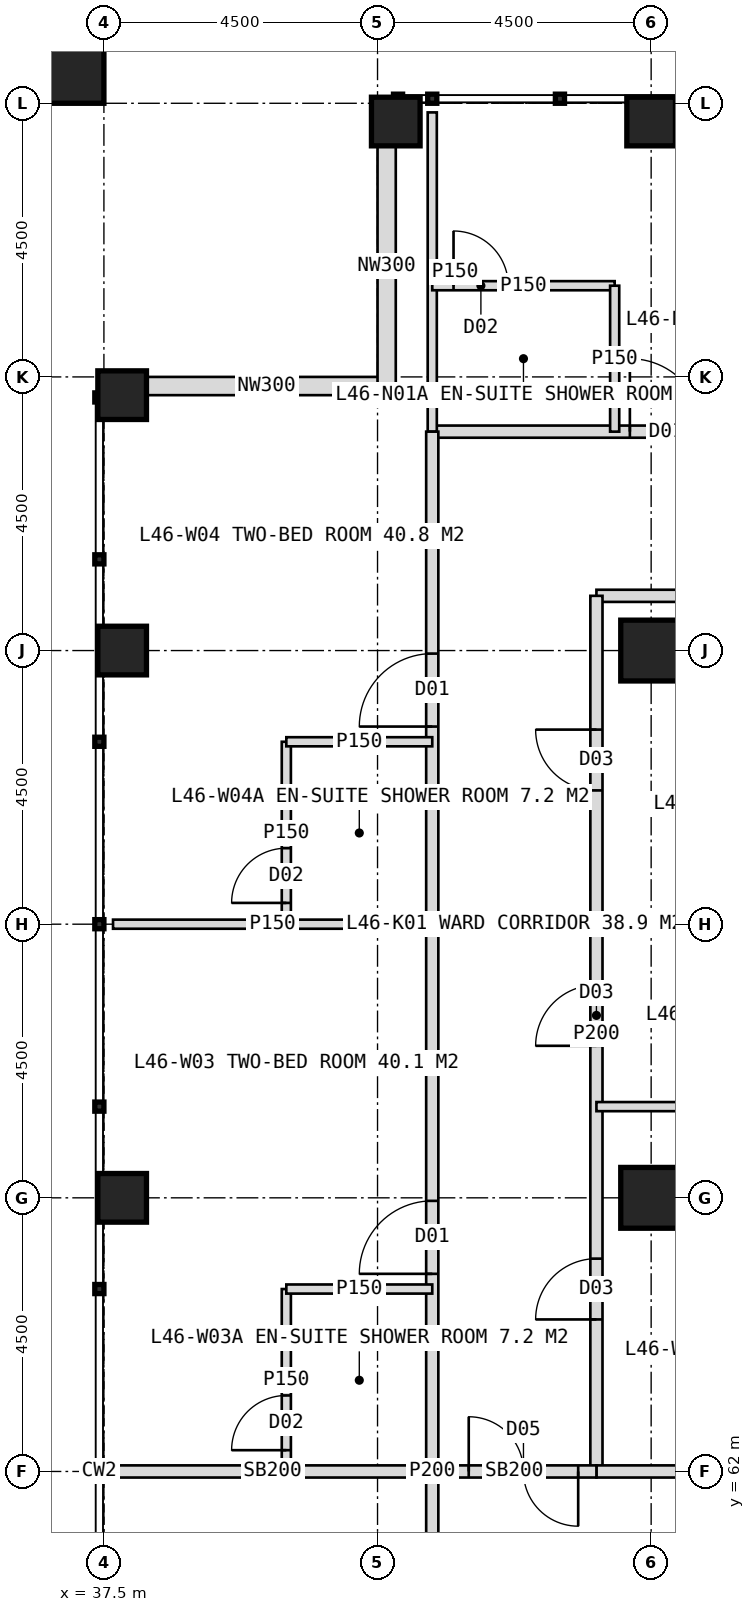
"""IFC4 building model, lengths in metres.
Left out: names, types, materials, properties, quantities, classifications, styles, units other than length and angle.
Written with IfcOpenShell. Run it as: python <this file> out.ifc"""

import sys

from ifc_helpers import new_model, si_unit, direction, frame, frame_2d, origin, origin_2d, place, context, subcontext, project, spatial, rectangle, hollow_rectangle, extrude, element, fill, save


model = new_model("IFC4")
c1 = context("Model", 3, precision=1e-05, world=origin(), true_north=direction((0.0, 1.0)))
c2 = subcontext(c1, "Body", "Model", "MODEL_VIEW")
j1 = project(units=[si_unit("LENGTHUNIT", "METRE"), si_unit("PLANEANGLEUNIT", "RADIAN")], contexts=[c1])
p1 = place(None, origin())
s1 = spatial("IfcSite", under=j1, at=p1, CompositionType="ELEMENT")
p2 = place(p1, origin())
s2 = spatial("IfcBuilding", under=s1, at=p2, CompositionType="ELEMENT")
p3 = place(p2, frame((0.0, 0.0, 193.0)))
s3 = spatial("IfcBuildingStorey", under=s2, at=p3, CompositionType="ELEMENT", Elevation=193.0)
for number, where, z_axis, x_axis in (
    (1, (46.5, 75.5, 0.0), (0.0, 0.0, 1.0), (1.0, 0.0, 0.0)),
    (2, (46.5, 66.5, 0.0), (0.0, 0.0, 1.0), (1.0, 0.0, 0.0)),
):
    element("IfcColumn", number, at=place(p3, frame(where, z_axis=z_axis, x_axis=x_axis)), inside=s3, PredefinedType="COLUMN", context=c2, shape_type="SweptSolid", body=[
        extrude(hollow_rectangle(XDim=1.0, YDim=1.0, WallThickness=0.1, at=origin_2d()), origin(), (0.0, 0.0, 1.0), 4.0),
    ])
for number, where, z_axis, x_axis in (
    (3, (42.3, 84.2, 0.0), (0.0, 0.0, 1.0), (1.0, 0.0, 0.0)),
    (4, (46.5, 84.2, 0.0), (0.0, 0.0, 1.0), (1.0, 0.0, 0.0)),
    (5, (37.8, 66.5, 0.0), (0.0, 0.0, 1.0), (1.0, 0.0, 0.0)),
    (6, (37.8, 75.5, 0.0), (0.0, 0.0, 1.0), (1.0, 0.0, 0.0)),
    (7, (37.8, 79.7, 0.0), (0.0, 0.0, 1.0), (1.0, 0.0, 0.0)),
):
    element("IfcColumn", number, at=place(p3, frame(where, z_axis=z_axis, x_axis=x_axis)), inside=s3, PredefinedType="COLUMN", context=c2, shape_type="SweptSolid", body=[
        extrude(hollow_rectangle(XDim=0.8, YDim=0.8, WallThickness=0.08, at=origin_2d()), origin(), (0.0, 0.0, 1.0), 4.0),
    ])
p4 = place(p3, frame((36.9, 85.1, 0.0), z_axis=(0.0, 0.0, 1.0), x_axis=(1.0, 0.0, 0.0)))
e8 = element("IfcColumn", 8, at=p4, inside=s3, PredefinedType="COLUMN", context=c2, shape_type="SweptSolid", body=[
    extrude(hollow_rectangle(XDim=1.2, YDim=1.2, WallThickness=0.07, at=origin_2d()), origin(), (0.0, 0.0, 1.0), 4.0),
])
for number, where, z_axis, x_axis in (
    (9, (38.2, 79.85, 0.0), (0.0, 0.0, 1.0), (1.0, 0.0, 0.0)),
    (10, (42.15, 79.85, 0.0), (0.0, 0.0, 1.0), (0.0, 1.0, 0.0)),
):
    element("IfcWall", number, at=place(p3, frame(where, z_axis=z_axis, x_axis=x_axis)), inside=s3, PredefinedType="ELEMENTEDWALL", context=c2, shape_type="SweptSolid", body=[
        extrude(rectangle(XDim=3.95, YDim=0.3, at=frame_2d((1.975, 0.0))), origin(), (0.0, 0.0, 1.0), 2.85),
    ])
p5 = place(p3, frame((42.9, 79.1, 0.0), z_axis=(0.0, 0.0, 1.0), x_axis=(1.0, 0.0, 0.0)))
e11 = element("IfcWall", 11, at=p5, inside=s3, PredefinedType="PARTITIONING", context=c2, shape_type="SweptSolid", body=[
    extrude(rectangle(XDim=34.2, YDim=0.2, at=frame_2d((17.1, 0.0))), origin(), (0.0, 0.0, 1.0), 3.75),
])
p6 = place(p5, frame((3.25, 0.0, 0.0)))
e12 = element("IfcOpeningElement", 12, at=p6, cuts=e11, PredefinedType="OPENING", context=c2, shape_type="SweptSolid", body=[
    extrude(rectangle(XDim=1.2, YDim=2.2, at=frame_2d((0.6, 1.1))), frame((0.0, 0.11, 0.0), z_axis=(0.0, -1.0, 0.0), x_axis=(1.0, 0.0, 0.0)), (0.0, 0.0, 1.0), 0.22),
])
p7 = place(p5, frame((10.6, 0.0, 0.0)))
e13 = element("IfcOpeningElement", 13, at=p7, cuts=e11, PredefinedType="OPENING", context=c2, shape_type="SweptSolid", body=[
    extrude(rectangle(XDim=1.0, YDim=2.1, at=frame_2d((0.5, 1.05))), frame((0.0, 0.11, 0.0), z_axis=(0.0, -1.0, 0.0), x_axis=(1.0, 0.0, 0.0)), (0.0, 0.0, 1.0), 0.22),
])
p8 = place(p5, frame((17.35, 0.0, 0.0)))
e14 = element("IfcOpeningElement", 14, at=p8, cuts=e11, PredefinedType="OPENING", context=c2, shape_type="SweptSolid", body=[
    extrude(rectangle(XDim=1.2, YDim=2.2, at=frame_2d((0.6, 1.1))), frame((0.0, 0.11, 0.0), z_axis=(0.0, -1.0, 0.0), x_axis=(1.0, 0.0, 0.0)), (0.0, 0.0, 1.0), 0.22),
])
p9 = place(p5, frame((25.75, 0.0, 0.0)))
e15 = element("IfcOpeningElement", 15, at=p9, cuts=e11, PredefinedType="OPENING", context=c2, shape_type="SweptSolid", body=[
    extrude(rectangle(XDim=1.2, YDim=2.2, at=frame_2d((0.6, 1.1))), frame((0.0, 0.11, 0.0), z_axis=(0.0, -1.0, 0.0), x_axis=(1.0, 0.0, 0.0)), (0.0, 0.0, 1.0), 0.22),
])
p10 = place(p3, frame((42.9, 79.1, 0.0), z_axis=(0.0, 0.0, 1.0), x_axis=(0.0, 1.0, 0.0)))
e16 = element("IfcWall", 16, at=p10, inside=s3, PredefinedType="PARTITIONING", context=c2, shape_type="SweptSolid", body=[
    extrude(rectangle(XDim=5.25, YDim=0.15, at=frame_2d((2.625, 0.0))), origin(), (0.0, 0.0, 1.0), 3.75),
])
p11 = place(p3, frame((42.9, 81.5, 0.0), z_axis=(0.0, 0.0, 1.0), x_axis=(1.0, 0.0, 0.0)))
e17 = element("IfcWall", 17, at=p11, inside=s3, PredefinedType="PARTITIONING", context=c2, shape_type="SweptSolid", body=[
    extrude(rectangle(XDim=3.0, YDim=0.15, at=frame_2d((1.5, 0.0))), origin(), (0.0, 0.0, 1.0), 3.75),
])
p12 = place(p11, frame((0.35, 0.0, 0.0)))
e18 = element("IfcOpeningElement", 18, at=p12, cuts=e17, PredefinedType="OPENING", context=c2, shape_type="SweptSolid", body=[
    extrude(rectangle(XDim=0.9, YDim=2.1, at=frame_2d((0.45, 1.05))), frame((0.0, 0.085, 0.0), z_axis=(0.0, -1.0, 0.0), x_axis=(1.0, 0.0, 0.0)), (0.0, 0.0, 1.0), 0.17),
])
p13 = place(p3, frame((45.9, 79.1, 0.0), z_axis=(0.0, 0.0, 1.0), x_axis=(0.0, 1.0, 0.0)))
e19 = element("IfcWall", 19, at=p13, inside=s3, PredefinedType="PARTITIONING", context=c2, shape_type="SweptSolid", body=[
    extrude(rectangle(XDim=2.4, YDim=0.15, at=frame_2d((1.2, 0.0))), origin(), (0.0, 0.0, 1.0), 3.75),
])
p14 = place(p3, frame((45.6, 76.4, 0.0), z_axis=(0.0, 0.0, 1.0), x_axis=(1.0, 0.0, 0.0)))
e20 = element("IfcWall", 20, at=p14, inside=s3, PredefinedType="PARTITIONING", context=c2, shape_type="SweptSolid", body=[
    extrude(rectangle(XDim=5.4, YDim=0.2, at=frame_2d((2.7, 0.0))), origin(), (0.0, 0.0, 1.0), 3.75),
])
p15 = place(p3, frame((42.9, 62.0, 0.0), z_axis=(0.0, 0.0, 1.0), x_axis=(-1.0, 0.0, 0.0)))
e21 = element("IfcWall", 21, at=p15, inside=s3, PredefinedType="SOLIDWALL", context=c2, shape_type="SweptSolid", body=[
    extrude(rectangle(XDim=5.25, YDim=0.2, at=frame_2d((2.625, 0.0))), origin(), (0.0, 0.0, 1.0), 2.95),
])
p16 = place(p3, frame((42.9, 71.0, 0.0), z_axis=(0.0, 0.0, 1.0), x_axis=(-1.0, 0.0, 0.0)))
e22 = element("IfcWall", 22, at=p16, inside=s3, PredefinedType="PARTITIONING", context=c2, shape_type="SweptSolid", body=[
    extrude(rectangle(XDim=5.25, YDim=0.15, at=frame_2d((2.625, 0.0))), origin(), (0.0, 0.0, 1.0), 3.75),
])
p17 = place(p3, frame((42.9, 44.9, 0.0), z_axis=(0.0, 0.0, 1.0), x_axis=(0.0, 1.0, 0.0)))
e23 = element("IfcWall", 23, at=p17, inside=s3, PredefinedType="PARTITIONING", context=c2, shape_type="SweptSolid", body=[
    extrude(rectangle(XDim=34.2, YDim=0.2, at=frame_2d((17.1, 0.0))), origin(), (0.0, 0.0, 1.0), 3.75),
])
p18 = place(p17, frame((3.25, 0.0, 0.0)))
e24 = element("IfcOpeningElement", 24, at=p18, cuts=e23, PredefinedType="OPENING", context=c2, shape_type="SweptSolid", body=[
    extrude(rectangle(XDim=1.2, YDim=2.2, at=frame_2d((0.6, 1.1))), frame((0.0, 0.11, 0.0), z_axis=(0.0, -1.0, 0.0), x_axis=(1.0, 0.0, 0.0)), (0.0, 0.0, 1.0), 0.22),
])
p19 = place(p17, frame((11.35, 0.0, 0.0)))
e25 = element("IfcOpeningElement", 25, at=p19, cuts=e23, PredefinedType="OPENING", context=c2, shape_type="SweptSolid", body=[
    extrude(rectangle(XDim=1.2, YDim=2.2, at=frame_2d((0.6, 1.1))), frame((0.0, 0.11, 0.0), z_axis=(0.0, -1.0, 0.0), x_axis=(1.0, 0.0, 0.0)), (0.0, 0.0, 1.0), 0.22),
])
p20 = place(p17, frame((20.35, 0.0, 0.0)))
e26 = element("IfcOpeningElement", 26, at=p20, cuts=e23, PredefinedType="OPENING", context=c2, shape_type="SweptSolid", body=[
    extrude(rectangle(XDim=1.2, YDim=2.2, at=frame_2d((0.6, 1.1))), frame((0.0, 0.11, 0.0), z_axis=(0.0, -1.0, 0.0), x_axis=(1.0, 0.0, 0.0)), (0.0, 0.0, 1.0), 0.22),
])
p21 = place(p17, frame((29.35, 0.0, 0.0)))
e27 = element("IfcOpeningElement", 27, at=p21, cuts=e23, PredefinedType="OPENING", context=c2, shape_type="SweptSolid", body=[
    extrude(rectangle(XDim=1.2, YDim=2.2, at=frame_2d((0.6, 1.1))), frame((0.0, 0.11, 0.0), z_axis=(0.0, -1.0, 0.0), x_axis=(1.0, 0.0, 0.0)), (0.0, 0.0, 1.0), 0.22),
])
p22 = place(p3, frame((40.5, 62.0, 0.0), z_axis=(0.0, 0.0, 1.0), x_axis=(0.0, 1.0, 0.0)))
e28 = element("IfcWall", 28, at=p22, inside=s3, PredefinedType="PARTITIONING", context=c2, shape_type="SweptSolid", body=[
    extrude(rectangle(XDim=3.0, YDim=0.15, at=frame_2d((1.5, 0.0))), origin(), (0.0, 0.0, 1.0), 3.75),
])
p23 = place(p22, frame((0.35, 0.0, 0.0)))
e29 = element("IfcOpeningElement", 29, at=p23, cuts=e28, PredefinedType="OPENING", context=c2, shape_type="SweptSolid", body=[
    extrude(rectangle(XDim=0.9, YDim=2.1, at=frame_2d((0.45, 1.05))), frame((0.0, 0.085, 0.0), z_axis=(0.0, -1.0, 0.0), x_axis=(1.0, 0.0, 0.0)), (0.0, 0.0, 1.0), 0.17),
])
p24 = place(p3, frame((42.9, 65.0, 0.0), z_axis=(0.0, 0.0, 1.0), x_axis=(-1.0, 0.0, 0.0)))
e30 = element("IfcWall", 30, at=p24, inside=s3, PredefinedType="PARTITIONING", context=c2, shape_type="SweptSolid", body=[
    extrude(rectangle(XDim=2.4, YDim=0.15, at=frame_2d((1.2, 0.0))), origin(), (0.0, 0.0, 1.0), 3.75),
])
p25 = place(p3, frame((40.5, 71.0, 0.0), z_axis=(0.0, 0.0, 1.0), x_axis=(0.0, 1.0, 0.0)))
e31 = element("IfcWall", 31, at=p25, inside=s3, PredefinedType="PARTITIONING", context=c2, shape_type="SweptSolid", body=[
    extrude(rectangle(XDim=3.0, YDim=0.15, at=frame_2d((1.5, 0.0))), origin(), (0.0, 0.0, 1.0), 3.75),
])
p26 = place(p25, frame((0.35, 0.0, 0.0)))
e32 = element("IfcOpeningElement", 32, at=p26, cuts=e31, PredefinedType="OPENING", context=c2, shape_type="SweptSolid", body=[
    extrude(rectangle(XDim=0.9, YDim=2.1, at=frame_2d((0.45, 1.05))), frame((0.0, 0.085, 0.0), z_axis=(0.0, -1.0, 0.0), x_axis=(1.0, 0.0, 0.0)), (0.0, 0.0, 1.0), 0.17),
])
p27 = place(p3, frame((42.9, 74.0, 0.0), z_axis=(0.0, 0.0, 1.0), x_axis=(-1.0, 0.0, 0.0)))
e33 = element("IfcWall", 33, at=p27, inside=s3, PredefinedType="PARTITIONING", context=c2, shape_type="SweptSolid", body=[
    extrude(rectangle(XDim=2.4, YDim=0.15, at=frame_2d((1.2, 0.0))), origin(), (0.0, 0.0, 1.0), 3.75),
])
p28 = place(p3, frame((45.6, 62.0, 0.0), z_axis=(0.0, 0.0, 1.0), x_axis=(0.0, 1.0, 0.0)))
e34 = element("IfcWall", 34, at=p28, inside=s3, PredefinedType="PARTITIONING", context=c2, shape_type="SweptSolid", body=[
    extrude(rectangle(XDim=14.4, YDim=0.2, at=frame_2d((7.2, 0.0))), origin(), (0.0, 0.0, 1.0), 3.75),
])
p29 = place(p28, frame((2.5, 0.0, 0.0)))
e35 = element("IfcOpeningElement", 35, at=p29, cuts=e34, PredefinedType="OPENING", context=c2, shape_type="SweptSolid", body=[
    extrude(rectangle(XDim=1.0, YDim=2.1, at=frame_2d((0.5, 1.05))), frame((0.0, 0.11, 0.0), z_axis=(0.0, -1.0, 0.0), x_axis=(1.0, 0.0, 0.0)), (0.0, 0.0, 1.0), 0.22),
])
p30 = place(p28, frame((7.0, 0.0, 0.0)))
e36 = element("IfcOpeningElement", 36, at=p30, cuts=e34, PredefinedType="OPENING", context=c2, shape_type="SweptSolid", body=[
    extrude(rectangle(XDim=1.0, YDim=2.1, at=frame_2d((0.5, 1.05))), frame((0.0, 0.11, 0.0), z_axis=(0.0, -1.0, 0.0), x_axis=(1.0, 0.0, 0.0)), (0.0, 0.0, 1.0), 0.22),
])
p31 = place(p28, frame((11.2, 0.0, 0.0)))
e37 = element("IfcOpeningElement", 37, at=p31, cuts=e34, PredefinedType="OPENING", context=c2, shape_type="SweptSolid", body=[
    extrude(rectangle(XDim=1.0, YDim=2.1, at=frame_2d((0.5, 1.05))), frame((0.0, 0.11, 0.0), z_axis=(0.0, -1.0, 0.0), x_axis=(1.0, 0.0, 0.0)), (0.0, 0.0, 1.0), 0.22),
])
p32 = place(p3, frame((51.0, 62.0, 0.0), z_axis=(0.0, 0.0, 1.0), x_axis=(-1.0, 0.0, 0.0)))
e38 = element("IfcWall", 38, at=p32, inside=s3, PredefinedType="SOLIDWALL", context=c2, shape_type="SweptSolid", body=[
    extrude(rectangle(XDim=5.4, YDim=0.2, at=frame_2d((2.7, 0.0))), origin(), (0.0, 0.0, 1.0), 2.95),
])
for number, where, z_axis, x_axis in (
    (39, (51.0, 68.0, 0.0), (0.0, 0.0, 1.0), (-1.0, 0.0, 0.0)),
    (40, (51.0, 71.0, 0.0), (0.0, 0.0, 1.0), (-1.0, 0.0, 0.0)),
):
    element("IfcWall", number, at=place(p3, frame(where, z_axis=z_axis, x_axis=x_axis)), inside=s3, PredefinedType="PARTITIONING", context=c2, shape_type="SweptSolid", body=[
        extrude(rectangle(XDim=5.4, YDim=0.15, at=frame_2d((2.7, 0.0))), origin(), (0.0, 0.0, 1.0), 3.75),
    ])
p33 = place(p3, frame((45.6, 62.0, 0.0), z_axis=(0.0, 0.0, 1.0), x_axis=(-1.0, 0.0, 0.0)))
e41 = element("IfcWall", 41, at=p33, inside=s3, PredefinedType="SOLIDWALL", context=c2, shape_type="SweptSolid", body=[
    extrude(rectangle(XDim=2.7, YDim=0.2, at=frame_2d((1.35, 0.0))), origin(), (0.0, 0.0, 1.0), 2.95),
])
p34 = place(p33, frame((0.3, 0.0, 0.0)))
e42 = element("IfcOpeningElement", 42, at=p34, cuts=e41, PredefinedType="OPENING", context=c2, shape_type="SweptSolid", body=[
    extrude(rectangle(XDim=1.8, YDim=2.2, at=frame_2d((0.9, 1.1))), frame((0.0, 0.11, 0.0), z_axis=(0.0, -1.0, 0.0), x_axis=(1.0, 0.0, 0.0)), (0.0, 0.0, 1.0), 0.22),
])
p35 = place(p6, origin())
e43 = element("IfcDoor", 43, at=p35, inside=s3, OperationType="SINGLE_SWING_LEFT", PredefinedType="DOOR", context=c2, shape_type="SweptSolid", body=[
    extrude(rectangle(XDim=1.2, YDim=2.2, at=frame_2d((0.6, 1.1))), frame((0.0, 0.025, 0.0), z_axis=(0.0, -1.0, 0.0), x_axis=(1.0, 0.0, 0.0)), (0.0, 0.0, 1.0), 0.05),
])
fill(e12, e43)
p36 = place(p12, origin())
e44 = element("IfcDoor", 44, at=p36, inside=s3, OperationType="SINGLE_SWING_LEFT", PredefinedType="DOOR", context=c2, shape_type="SweptSolid", body=[
    extrude(rectangle(XDim=0.9, YDim=2.1, at=frame_2d((0.45, 1.05))), frame((0.0, 0.025, 0.0), z_axis=(0.0, -1.0, 0.0), x_axis=(1.0, 0.0, 0.0)), (0.0, 0.0, 1.0), 0.05),
])
fill(e18, e44)
p37 = place(p20, origin())
e45 = element("IfcDoor", 45, at=p37, inside=s3, OperationType="SINGLE_SWING_LEFT", PredefinedType="DOOR", context=c2, shape_type="SweptSolid", body=[
    extrude(rectangle(XDim=1.2, YDim=2.2, at=frame_2d((0.6, 1.1))), frame((0.0, 0.025, 0.0), z_axis=(0.0, -1.0, 0.0), x_axis=(1.0, 0.0, 0.0)), (0.0, 0.0, 1.0), 0.05),
])
fill(e26, e45)
p38 = place(p23, origin())
e46 = element("IfcDoor", 46, at=p38, inside=s3, OperationType="SINGLE_SWING_LEFT", PredefinedType="DOOR", context=c2, shape_type="SweptSolid", body=[
    extrude(rectangle(XDim=0.9, YDim=2.1, at=frame_2d((0.45, 1.05))), frame((0.0, 0.025, 0.0), z_axis=(0.0, -1.0, 0.0), x_axis=(1.0, 0.0, 0.0)), (0.0, 0.0, 1.0), 0.05),
])
fill(e29, e46)
p39 = place(p21, origin())
e47 = element("IfcDoor", 47, at=p39, inside=s3, OperationType="SINGLE_SWING_LEFT", PredefinedType="DOOR", context=c2, shape_type="SweptSolid", body=[
    extrude(rectangle(XDim=1.2, YDim=2.2, at=frame_2d((0.6, 1.1))), frame((0.0, 0.025, 0.0), z_axis=(0.0, -1.0, 0.0), x_axis=(1.0, 0.0, 0.0)), (0.0, 0.0, 1.0), 0.05),
])
fill(e27, e47)
p40 = place(p26, origin())
e48 = element("IfcDoor", 48, at=p40, inside=s3, OperationType="SINGLE_SWING_LEFT", PredefinedType="DOOR", context=c2, shape_type="SweptSolid", body=[
    extrude(rectangle(XDim=0.9, YDim=2.1, at=frame_2d((0.45, 1.05))), frame((0.0, 0.025, 0.0), z_axis=(0.0, -1.0, 0.0), x_axis=(1.0, 0.0, 0.0)), (0.0, 0.0, 1.0), 0.05),
])
fill(e32, e48)
p41 = place(p29, origin())
e49 = element("IfcDoor", 49, at=p41, inside=s3, OperationType="SINGLE_SWING_LEFT", PredefinedType="DOOR", context=c2, shape_type="SweptSolid", body=[
    extrude(rectangle(XDim=1.0, YDim=2.1, at=frame_2d((0.5, 1.05))), frame((0.0, 0.025, 0.0), z_axis=(0.0, -1.0, 0.0), x_axis=(1.0, 0.0, 0.0)), (0.0, 0.0, 1.0), 0.05),
])
fill(e35, e49)
p42 = place(p30, origin())
e50 = element("IfcDoor", 50, at=p42, inside=s3, OperationType="SINGLE_SWING_LEFT", PredefinedType="DOOR", context=c2, shape_type="SweptSolid", body=[
    extrude(rectangle(XDim=1.0, YDim=2.1, at=frame_2d((0.5, 1.05))), frame((0.0, 0.025, 0.0), z_axis=(0.0, -1.0, 0.0), x_axis=(1.0, 0.0, 0.0)), (0.0, 0.0, 1.0), 0.05),
])
fill(e36, e50)
p43 = place(p31, origin())
e51 = element("IfcDoor", 51, at=p43, inside=s3, OperationType="SINGLE_SWING_RIGHT", PredefinedType="DOOR", context=c2, shape_type="SweptSolid", body=[
    extrude(rectangle(XDim=1.0, YDim=2.1, at=frame_2d((0.5, 1.05))), frame((0.0, 0.025, 0.0), z_axis=(0.0, -1.0, 0.0), x_axis=(1.0, 0.0, 0.0)), (0.0, 0.0, 1.0), 0.05),
])
fill(e37, e51)
p44 = place(p34, origin())
e52 = element("IfcDoor", 52, at=p44, inside=s3, OperationType="DOUBLE_DOOR_DOUBLE_SWING", PredefinedType="DOOR", context=c2, shape_type="SweptSolid", body=[
    extrude(rectangle(XDim=1.8, YDim=2.2, at=frame_2d((0.9, 1.1))), frame((0.0, 0.025, 0.0), z_axis=(0.0, -1.0, 0.0), x_axis=(1.0, 0.0, 0.0)), (0.0, 0.0, 1.0), 0.05),
])
fill(e42, e52)
save(model, sys.argv[1])
